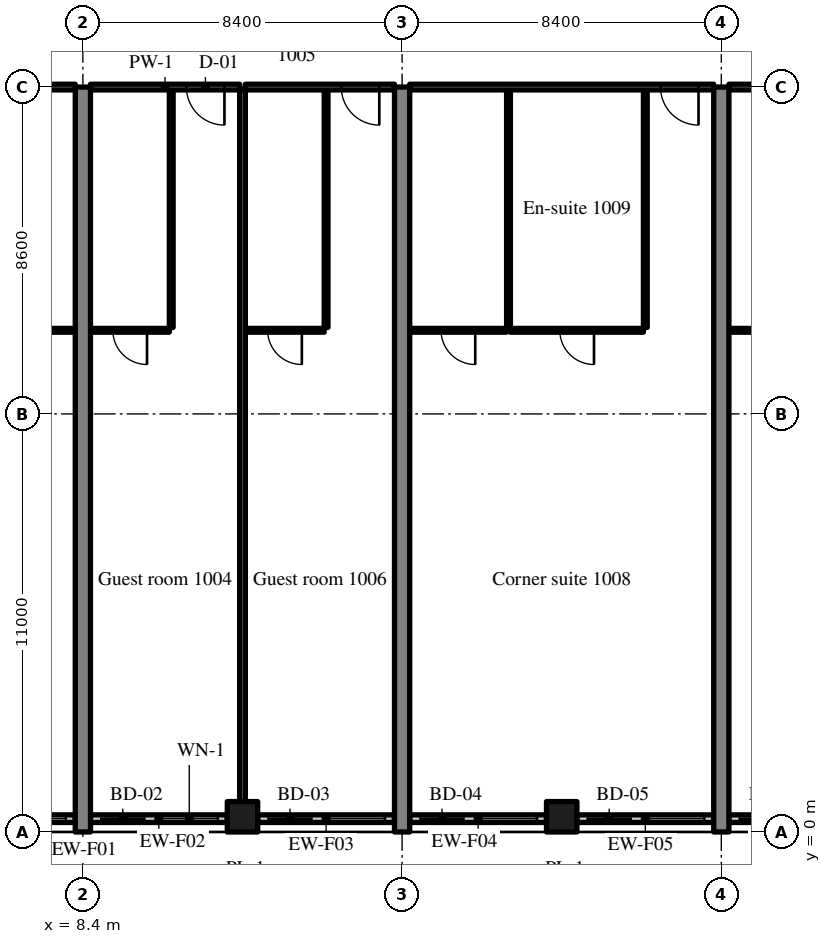
"""IFC4 building model, lengths in metres.
Left out: names, types, materials, properties, quantities, classifications, styles, units other than length and angle.
Written with IfcOpenShell. Run it as: python <this file> out.ifc"""

import sys

from ifc_helpers import new_model, si_unit, direction, frame, frame_2d, origin, origin_2d, place, context, subcontext, project, spatial, rectangle, extrude, source, transform, mapped, element, fill, save


model = new_model("IFC4")
c1 = context("Model", 3, precision=1e-05, world=origin(), true_north=direction((0.0, 1.0)))
c2 = subcontext(c1, "Body", "Model", "MODEL_VIEW")
j1 = project(units=[si_unit("LENGTHUNIT", "METRE"), si_unit("PLANEANGLEUNIT", "RADIAN")], contexts=[c1])
p1 = place(None, origin())
s1 = spatial("IfcSite", under=j1, at=p1, CompositionType="ELEMENT")
p2 = place(p1, origin())
s2 = spatial("IfcBuilding", under=s1, at=p2, CompositionType="ELEMENT")
p3 = place(p2, frame((0.0, 0.0, 46.8)))
s3 = spatial("IfcBuildingStorey", under=s2, at=p3, CompositionType="ELEMENT", Elevation=46.8)
m1 = source(origin(), c2, "Body", "SweptSolid", [
    extrude(rectangle(XDim=19.6, YDim=0.4, at=frame_2d((9.8, 0.0))), origin(), (0.0, 0.0, 1.0), 3.52),
])
for number, where, z_axis, x_axis in (
    (1, (8.4, 0.0, 0.0), (0.0, 0.0, 1.0), (0.0, 1.0, 0.0)),
    (2, (16.8, 0.0, 0.0), (0.0, 0.0, 1.0), (0.0, 1.0, 0.0)),
    (3, (25.2, 0.0, 0.0), (0.0, 0.0, 1.0), (0.0, 1.0, 0.0)),
):
    element("IfcWall", number, at=place(p3, frame(where, z_axis=z_axis, x_axis=x_axis)), inside=s3, PredefinedType="SHEAR", context=c2, shape_type="MappedRepresentation", body=[
        mapped(m1, transform((0.0, 0.0, 0.0), scale=1.0)),
    ])
m2 = source(origin(), c2, "Body", "SweptSolid", [
    extrude(rectangle(XDim=0.8, YDim=0.8, at=origin_2d()), origin(), (0.0, 0.0, 1.0), 3.52),
])
for number, where, z_axis, x_axis in (
    (4, (12.6, 0.4, 0.0), (0.0, 0.0, 1.0), (1.0, 0.0, 0.0)),
    (5, (21.0, 0.4, 0.0), (0.0, 0.0, 1.0), (1.0, 0.0, 0.0)),
):
    element("IfcColumn", number, at=place(p3, frame(where, z_axis=z_axis, x_axis=x_axis)), inside=s3, PredefinedType="COLUMN", context=c2, shape_type="MappedRepresentation", body=[
        mapped(m2, transform((0.0, 0.0, 0.0), scale=1.0)),
    ])
m3 = source(origin(), c2, "Body", "SweptSolid", [
    extrude(rectangle(XDim=4.055, YDim=0.2, at=frame_2d((2.027, 0.0))), origin(), (0.0, 0.0, 1.0), 2.82),
])
p4 = place(p3, frame((4.145, 0.35, 0.0), z_axis=(0.0, 0.0, 1.0), x_axis=(1.0, 0.0, 0.0)))
e6 = element("IfcWall", 6, at=p4, inside=s3, PredefinedType="SOLIDWALL", context=c2, shape_type="MappedRepresentation", body=[
    mapped(m3, transform((0.0, 0.0, 0.0), scale=1.0)),
])
m4 = source(origin(), c2, "Body", "SweptSolid", [
    extrude(rectangle(XDim=1.2, YDim=2.4, at=frame_2d((0.6, 1.2))), frame((0.0, 0.11, 0.0), z_axis=(0.0, -1.0, 0.0), x_axis=(1.0, 0.0, 0.0)), (0.0, 0.0, 1.0), 0.22),
])
p5 = place(p4, frame((0.25, 0.0, 0.0)))
e7 = element("IfcOpeningElement", 7, at=p5, cuts=e6, PredefinedType="OPENING", context=c2, shape_type="MappedRepresentation", body=[
    mapped(m4, transform((0.0, 0.0, 0.0), scale=1.0)),
])
m5 = source(origin(), c2, "Body", "SweptSolid", [
    extrude(rectangle(XDim=1.5, YDim=1.5, at=frame_2d((0.75, 0.75))), frame((0.0, 0.11, 0.0), z_axis=(0.0, -1.0, 0.0), x_axis=(1.0, 0.0, 0.0)), (0.0, 0.0, 1.0), 0.22),
])
p6 = place(p4, frame((2.305, 0.0, 0.9)))
e8 = element("IfcOpeningElement", 8, at=p6, cuts=e6, PredefinedType="OPENING", context=c2, shape_type="MappedRepresentation", body=[
    mapped(m5, transform((0.0, 0.0, 0.0), scale=1.0)),
])
m6 = source(origin(), c2, "Body", "SweptSolid", [
    extrude(rectangle(XDim=3.6, YDim=0.2, at=frame_2d((1.8, 0.0))), origin(), (0.0, 0.0, 1.0), 2.82),
])
p7 = place(p3, frame((8.6, 0.35, 0.0), z_axis=(0.0, 0.0, 1.0), x_axis=(1.0, 0.0, 0.0)))
e9 = element("IfcWall", 9, at=p7, inside=s3, PredefinedType="SOLIDWALL", context=c2, shape_type="MappedRepresentation", body=[
    mapped(m6, transform((0.0, 0.0, 0.0), scale=1.0)),
])
p8 = place(p7, frame((0.25, 0.0, 0.0)))
e10 = element("IfcOpeningElement", 10, at=p8, cuts=e9, PredefinedType="OPENING", context=c2, shape_type="MappedRepresentation", body=[
    mapped(m4, transform((0.0, 0.0, 0.0), scale=1.0)),
])
p9 = place(p7, frame((1.85, 0.0, 0.9)))
e11 = element("IfcOpeningElement", 11, at=p9, cuts=e9, PredefinedType="OPENING", context=c2, shape_type="MappedRepresentation", body=[
    mapped(m5, transform((0.0, 0.0, 0.0), scale=1.0)),
])
m7 = source(origin(), c2, "Body", "SweptSolid", [
    extrude(rectangle(XDim=3.6, YDim=0.2, at=frame_2d((1.8, 0.0))), origin(), (0.0, 0.0, 1.0), 2.82),
])
p10 = place(p3, frame((13.0, 0.35, 0.0), z_axis=(0.0, 0.0, 1.0), x_axis=(1.0, 0.0, 0.0)))
e12 = element("IfcWall", 12, at=p10, inside=s3, PredefinedType="SOLIDWALL", context=c2, shape_type="MappedRepresentation", body=[
    mapped(m7, transform((0.0, 0.0, 0.0), scale=1.0)),
])
p11 = place(p10, frame((0.25, 0.0, 0.0)))
e13 = element("IfcOpeningElement", 13, at=p11, cuts=e12, PredefinedType="OPENING", context=c2, shape_type="MappedRepresentation", body=[
    mapped(m4, transform((0.0, 0.0, 0.0), scale=1.0)),
])
p12 = place(p10, frame((1.85, 0.0, 0.9)))
e14 = element("IfcOpeningElement", 14, at=p12, cuts=e12, PredefinedType="OPENING", context=c2, shape_type="MappedRepresentation", body=[
    mapped(m5, transform((0.0, 0.0, 0.0), scale=1.0)),
])
p13 = place(p3, frame((17.0, 0.35, 0.0), z_axis=(0.0, 0.0, 1.0), x_axis=(1.0, 0.0, 0.0)))
e15 = element("IfcWall", 15, at=p13, inside=s3, PredefinedType="SOLIDWALL", context=c2, shape_type="MappedRepresentation", body=[
    mapped(m7, transform((0.0, 0.0, 0.0), scale=1.0)),
])
p14 = place(p13, frame((0.25, 0.0, 0.0)))
e16 = element("IfcOpeningElement", 16, at=p14, cuts=e15, PredefinedType="OPENING", context=c2, shape_type="MappedRepresentation", body=[
    mapped(m4, transform((0.0, 0.0, 0.0), scale=1.0)),
])
p15 = place(p13, frame((1.85, 0.0, 0.9)))
e17 = element("IfcOpeningElement", 17, at=p15, cuts=e15, PredefinedType="OPENING", context=c2, shape_type="MappedRepresentation", body=[
    mapped(m5, transform((0.0, 0.0, 0.0), scale=1.0)),
])
p16 = place(p3, frame((21.4, 0.35, 0.0), z_axis=(0.0, 0.0, 1.0), x_axis=(1.0, 0.0, 0.0)))
e18 = element("IfcWall", 18, at=p16, inside=s3, PredefinedType="SOLIDWALL", context=c2, shape_type="MappedRepresentation", body=[
    mapped(m7, transform((0.0, 0.0, 0.0), scale=1.0)),
])
p17 = place(p16, frame((0.25, 0.0, 0.0)))
e19 = element("IfcOpeningElement", 19, at=p17, cuts=e18, PredefinedType="OPENING", context=c2, shape_type="MappedRepresentation", body=[
    mapped(m4, transform((0.0, 0.0, 0.0), scale=1.0)),
])
p18 = place(p16, frame((1.85, 0.0, 0.9)))
e20 = element("IfcOpeningElement", 20, at=p18, cuts=e18, PredefinedType="OPENING", context=c2, shape_type="MappedRepresentation", body=[
    mapped(m5, transform((0.0, 0.0, 0.0), scale=1.0)),
])
p19 = place(p3, frame((25.4, 0.35, 0.0), z_axis=(0.0, 0.0, 1.0), x_axis=(1.0, 0.0, 0.0)))
e21 = element("IfcWall", 21, at=p19, inside=s3, PredefinedType="SOLIDWALL", context=c2, shape_type="MappedRepresentation", body=[
    mapped(m7, transform((0.0, 0.0, 0.0), scale=1.0)),
])
p20 = place(p19, frame((0.25, 0.0, 0.0)))
e22 = element("IfcOpeningElement", 22, at=p20, cuts=e21, PredefinedType="OPENING", context=c2, shape_type="MappedRepresentation", body=[
    mapped(m4, transform((0.0, 0.0, 0.0), scale=1.0)),
])
p21 = place(p19, frame((1.85, 0.0, 0.9)))
e23 = element("IfcOpeningElement", 23, at=p21, cuts=e21, PredefinedType="OPENING", context=c2, shape_type="MappedRepresentation", body=[
    mapped(m5, transform((0.0, 0.0, 0.0), scale=1.0)),
])
m8 = source(origin(), c2, "Body", "SweptSolid", [
    extrude(rectangle(XDim=2.35, YDim=0.1, at=frame_2d((1.175, 0.0))), origin(), (0.0, 0.0, 1.0), 3.52),
])
p22 = place(p3, frame((5.85, 13.2, 0.0), z_axis=(0.0, 0.0, 1.0), x_axis=(1.0, 0.0, 0.0)))
e24 = element("IfcWall", 24, at=p22, inside=s3, PredefinedType="PARTITIONING", context=c2, shape_type="MappedRepresentation", body=[
    mapped(m8, transform((0.0, 0.0, 0.0), scale=1.0)),
])
m9 = source(origin(), c2, "Body", "SweptSolid", [
    extrude(rectangle(XDim=0.9, YDim=2.1, at=frame_2d((0.45, 1.05))), frame((0.0, 0.06, 0.0), z_axis=(0.0, -1.0, 0.0), x_axis=(1.0, 0.0, 0.0)), (0.0, 0.0, 1.0), 0.12),
])
p23 = place(p22, frame((0.725, 0.0, 0.0)))
e25 = element("IfcOpeningElement", 25, at=p23, cuts=e24, PredefinedType="OPENING", context=c2, shape_type="MappedRepresentation", body=[
    mapped(m9, transform((0.0, 0.0, 0.0), scale=1.0)),
])
m10 = source(origin(), c2, "Body", "SweptSolid", [
    extrude(rectangle(XDim=7.8, YDim=0.15, at=frame_2d((3.9, 0.0))), origin(), (0.0, 0.0, 1.0), 2.82),
])
p24 = place(p3, frame((0.4, 19.6, 0.0), z_axis=(0.0, 0.0, 1.0), x_axis=(1.0, 0.0, 0.0)))
e26 = element("IfcWall", 26, at=p24, inside=s3, PredefinedType="PARTITIONING", context=c2, shape_type="MappedRepresentation", body=[
    mapped(m10, transform((0.0, 0.0, 0.0), scale=1.0)),
])
m11 = source(origin(), c2, "Body", "SweptSolid", [
    extrude(rectangle(XDim=1.0, YDim=2.1, at=frame_2d((0.5, 1.05))), frame((0.0, 0.085, 0.0), z_axis=(0.0, -1.0, 0.0), x_axis=(1.0, 0.0, 0.0)), (0.0, 0.0, 1.0), 0.17),
])
p25 = place(p24, frame((0.4, 0.0, 0.0)))
e27 = element("IfcOpeningElement", 27, at=p25, cuts=e26, PredefinedType="OPENING", context=c2, shape_type="MappedRepresentation", body=[
    mapped(m11, transform((0.0, 0.0, 0.0), scale=1.0)),
])
m12 = source(origin(), c2, "Body", "SweptSolid", [
    extrude(rectangle(XDim=6.25, YDim=0.1, at=frame_2d((3.125, 0.0))), origin(), (0.0, 0.0, 1.0), 3.52),
])
p26 = place(p3, frame((10.725, 13.275, 0.0), z_axis=(0.0, 0.0, 1.0), x_axis=(0.0, 1.0, 0.0)))
e28 = element("IfcWall", 28, at=p26, inside=s3, PredefinedType="PARTITIONING", context=c2, shape_type="MappedRepresentation", body=[
    mapped(m12, transform((0.0, 0.0, 0.0), scale=1.0)),
])
m13 = source(origin(), c2, "Body", "SweptSolid", [
    extrude(rectangle(XDim=2.075, YDim=0.1, at=frame_2d((1.038, 0.0))), origin(), (0.0, 0.0, 1.0), 3.52),
])
p27 = place(p3, frame((8.6, 13.2, 0.0), z_axis=(0.0, 0.0, 1.0), x_axis=(1.0, 0.0, 0.0)))
e29 = element("IfcWall", 29, at=p27, inside=s3, PredefinedType="PARTITIONING", context=c2, shape_type="MappedRepresentation", body=[
    mapped(m13, transform((0.0, 0.0, 0.0), scale=1.0)),
])
p28 = place(p27, frame((0.588, 0.0, 0.0)))
e30 = element("IfcOpeningElement", 30, at=p28, cuts=e29, PredefinedType="OPENING", context=c2, shape_type="MappedRepresentation", body=[
    mapped(m9, transform((0.0, 0.0, 0.0), scale=1.0)),
])
m14 = source(origin(), c2, "Body", "SweptSolid", [
    extrude(rectangle(XDim=3.925, YDim=0.15, at=frame_2d((1.962, 0.0))), origin(), (0.0, 0.0, 1.0), 2.82),
])
p29 = place(p3, frame((8.6, 19.6, 0.0), z_axis=(0.0, 0.0, 1.0), x_axis=(1.0, 0.0, 0.0)))
e31 = element("IfcWall", 31, at=p29, inside=s3, PredefinedType="PARTITIONING", context=c2, shape_type="MappedRepresentation", body=[
    mapped(m14, transform((0.0, 0.0, 0.0), scale=1.0)),
])
p30 = place(p29, frame((2.525, 0.0, 0.0)))
e32 = element("IfcOpeningElement", 32, at=p30, cuts=e31, PredefinedType="OPENING", context=c2, shape_type="MappedRepresentation", body=[
    mapped(m11, transform((0.0, 0.0, 0.0), scale=1.0)),
])
p31 = place(p3, frame((14.8, 13.275, 0.0), z_axis=(0.0, 0.0, 1.0), x_axis=(0.0, 1.0, 0.0)))
e33 = element("IfcWall", 33, at=p31, inside=s3, PredefinedType="PARTITIONING", context=c2, shape_type="MappedRepresentation", body=[
    mapped(m12, transform((0.0, 0.0, 0.0), scale=1.0)),
])
p32 = place(p3, frame((12.675, 13.2, 0.0), z_axis=(0.0, 0.0, 1.0), x_axis=(1.0, 0.0, 0.0)))
e34 = element("IfcWall", 34, at=p32, inside=s3, PredefinedType="PARTITIONING", context=c2, shape_type="MappedRepresentation", body=[
    mapped(m13, transform((0.0, 0.0, 0.0), scale=1.0)),
])
p33 = place(p32, frame((0.587, 0.0, 0.0)))
e35 = element("IfcOpeningElement", 35, at=p33, cuts=e34, PredefinedType="OPENING", context=c2, shape_type="MappedRepresentation", body=[
    mapped(m9, transform((0.0, 0.0, 0.0), scale=1.0)),
])
m15 = source(origin(), c2, "Body", "SweptSolid", [
    extrude(rectangle(XDim=3.925, YDim=0.15, at=frame_2d((1.962, 0.0))), origin(), (0.0, 0.0, 1.0), 2.82),
])
p34 = place(p3, frame((12.675, 19.6, 0.0), z_axis=(0.0, 0.0, 1.0), x_axis=(1.0, 0.0, 0.0)))
e36 = element("IfcWall", 36, at=p34, inside=s3, PredefinedType="PARTITIONING", context=c2, shape_type="MappedRepresentation", body=[
    mapped(m15, transform((0.0, 0.0, 0.0), scale=1.0)),
])
p35 = place(p34, frame((2.525, 0.0, 0.0)))
e37 = element("IfcOpeningElement", 37, at=p35, cuts=e36, PredefinedType="OPENING", context=c2, shape_type="MappedRepresentation", body=[
    mapped(m11, transform((0.0, 0.0, 0.0), scale=1.0)),
])
m16 = source(origin(), c2, "Body", "SweptSolid", [
    extrude(rectangle(XDim=18.725, YDim=0.15, at=frame_2d((9.362, 0.0))), origin(), (0.0, 0.0, 1.0), 3.52),
])
p36 = place(p3, frame((12.6, 0.8, 0.0), z_axis=(0.0, 0.0, 1.0), x_axis=(0.0, 1.0, 0.0)))
e38 = element("IfcWall", 38, at=p36, inside=s3, PredefinedType="PARTITIONING", context=c2, shape_type="MappedRepresentation", body=[
    mapped(m16, transform((0.0, 0.0, 0.0), scale=1.0)),
])
for number, where, z_axis, x_axis in (
    (39, (23.2, 13.275, 0.0), (0.0, 0.0, 1.0), (0.0, 1.0, 0.0)),
    (40, (19.6, 13.275, 0.0), (0.0, 0.0, 1.0), (0.0, 1.0, 0.0)),
):
    element("IfcWall", number, at=place(p3, frame(where, z_axis=z_axis, x_axis=x_axis)), inside=s3, PredefinedType="PARTITIONING", context=c2, shape_type="MappedRepresentation", body=[
        mapped(m12, transform((0.0, 0.0, 0.0), scale=1.0)),
    ])
m17 = source(origin(), c2, "Body", "SweptSolid", [
    extrude(rectangle(XDim=3.5, YDim=0.1, at=frame_2d((1.75, 0.0))), origin(), (0.0, 0.0, 1.0), 3.52),
])
p37 = place(p3, frame((19.65, 13.2, 0.0), z_axis=(0.0, 0.0, 1.0), x_axis=(1.0, 0.0, 0.0)))
e41 = element("IfcWall", 41, at=p37, inside=s3, PredefinedType="PARTITIONING", context=c2, shape_type="MappedRepresentation", body=[
    mapped(m17, transform((0.0, 0.0, 0.0), scale=1.0)),
])
p38 = place(p37, frame((1.3, 0.0, 0.0)))
e42 = element("IfcOpeningElement", 42, at=p38, cuts=e41, PredefinedType="OPENING", context=c2, shape_type="MappedRepresentation", body=[
    mapped(m9, transform((0.0, 0.0, 0.0), scale=1.0)),
])
m18 = source(origin(), c2, "Body", "SweptSolid", [
    extrude(rectangle(XDim=2.55, YDim=0.1, at=frame_2d((1.275, 0.0))), origin(), (0.0, 0.0, 1.0), 3.52),
])
p39 = place(p3, frame((17.0, 13.2, 0.0), z_axis=(0.0, 0.0, 1.0), x_axis=(1.0, 0.0, 0.0)))
e43 = element("IfcWall", 43, at=p39, inside=s3, PredefinedType="PARTITIONING", context=c2, shape_type="MappedRepresentation", body=[
    mapped(m18, transform((0.0, 0.0, 0.0), scale=1.0)),
])
p40 = place(p39, frame((0.825, 0.0, 0.0)))
e44 = element("IfcOpeningElement", 44, at=p40, cuts=e43, PredefinedType="OPENING", context=c2, shape_type="MappedRepresentation", body=[
    mapped(m9, transform((0.0, 0.0, 0.0), scale=1.0)),
])
m19 = source(origin(), c2, "Body", "SweptSolid", [
    extrude(rectangle(XDim=8.0, YDim=0.15, at=frame_2d((4.0, 0.0))), origin(), (0.0, 0.0, 1.0), 2.82),
])
p41 = place(p3, frame((17.0, 19.6, 0.0), z_axis=(0.0, 0.0, 1.0), x_axis=(1.0, 0.0, 0.0)))
e45 = element("IfcWall", 45, at=p41, inside=s3, PredefinedType="PARTITIONING", context=c2, shape_type="MappedRepresentation", body=[
    mapped(m19, transform((0.0, 0.0, 0.0), scale=1.0)),
])
p42 = place(p41, frame((6.6, 0.0, 0.0)))
e46 = element("IfcOpeningElement", 46, at=p42, cuts=e45, PredefinedType="OPENING", context=c2, shape_type="MappedRepresentation", body=[
    mapped(m11, transform((0.0, 0.0, 0.0), scale=1.0)),
])
p43 = place(p3, frame((25.4, 13.2, 0.0), z_axis=(0.0, 0.0, 1.0), x_axis=(1.0, 0.0, 0.0)))
e47 = element("IfcWall", 47, at=p43, inside=s3, PredefinedType="PARTITIONING", context=c2, shape_type="MappedRepresentation", body=[
    mapped(m18, transform((0.0, 0.0, 0.0), scale=1.0)),
])
p44 = place(p43, frame((0.825, 0.0, 0.0)))
e48 = element("IfcOpeningElement", 48, at=p44, cuts=e47, PredefinedType="OPENING", context=c2, shape_type="MappedRepresentation", body=[
    mapped(m9, transform((0.0, 0.0, 0.0), scale=1.0)),
])
p45 = place(p3, frame((25.4, 19.6, 0.0), z_axis=(0.0, 0.0, 1.0), x_axis=(1.0, 0.0, 0.0)))
e49 = element("IfcWall", 49, at=p45, inside=s3, PredefinedType="PARTITIONING", context=c2, shape_type="MappedRepresentation", body=[
    mapped(m19, transform((0.0, 0.0, 0.0), scale=1.0)),
])
p46 = place(p45, frame((6.6, 0.0, 0.0)))
e50 = element("IfcOpeningElement", 50, at=p46, cuts=e49, PredefinedType="OPENING", context=c2, shape_type="MappedRepresentation", body=[
    mapped(m11, transform((0.0, 0.0, 0.0), scale=1.0)),
])
m20 = source(origin(), c2, "Body", "SweptSolid", [
    extrude(rectangle(XDim=1.5, YDim=1.5, at=frame_2d((0.75, 0.75))), frame((0.0, 0.03, 0.0), z_axis=(0.0, -1.0, 0.0), x_axis=(1.0, 0.0, 0.0)), (0.0, 0.0, 1.0), 0.06),
])
p47 = place(p6, origin())
e51 = element("IfcWindow", 51, at=p47, inside=s3, PartitioningType="SINGLE_PANEL", PredefinedType="WINDOW", context=c2, shape_type="MappedRepresentation", body=[
    mapped(m20, transform((0.0, 0.0, 0.0), scale=1.0)),
])
fill(e8, e51)
m21 = source(origin(), c2, "Body", "SweptSolid", [
    extrude(rectangle(XDim=1.2, YDim=2.4, at=frame_2d((0.6, 1.2))), frame((0.0, 0.025, 0.0), z_axis=(0.0, -1.0, 0.0), x_axis=(1.0, 0.0, 0.0)), (0.0, 0.0, 1.0), 0.05),
])
p48 = place(p8, origin())
e52 = element("IfcDoor", 52, at=p48, inside=s3, OperationType="SLIDING_TO_RIGHT", PredefinedType="DOOR", context=c2, shape_type="MappedRepresentation", body=[
    mapped(m21, transform((0.0, 0.0, 0.0), scale=1.0)),
])
fill(e10, e52)
p49 = place(p9, origin())
e53 = element("IfcWindow", 53, at=p49, inside=s3, PartitioningType="SINGLE_PANEL", PredefinedType="WINDOW", context=c2, shape_type="MappedRepresentation", body=[
    mapped(m20, transform((0.0, 0.0, 0.0), scale=1.0)),
])
fill(e11, e53)
p50 = place(p11, origin())
e54 = element("IfcDoor", 54, at=p50, inside=s3, OperationType="SLIDING_TO_LEFT", PredefinedType="DOOR", context=c2, shape_type="MappedRepresentation", body=[
    mapped(m21, transform((0.0, 0.0, 0.0), scale=1.0)),
])
fill(e13, e54)
p51 = place(p12, origin())
e55 = element("IfcWindow", 55, at=p51, inside=s3, PartitioningType="SINGLE_PANEL", PredefinedType="WINDOW", context=c2, shape_type="MappedRepresentation", body=[
    mapped(m20, transform((0.0, 0.0, 0.0), scale=1.0)),
])
fill(e14, e55)
p52 = place(p14, origin())
e56 = element("IfcDoor", 56, at=p52, inside=s3, OperationType="SLIDING_TO_RIGHT", PredefinedType="DOOR", context=c2, shape_type="MappedRepresentation", body=[
    mapped(m21, transform((0.0, 0.0, 0.0), scale=1.0)),
])
fill(e16, e56)
p53 = place(p15, origin())
e57 = element("IfcWindow", 57, at=p53, inside=s3, PartitioningType="SINGLE_PANEL", PredefinedType="WINDOW", context=c2, shape_type="MappedRepresentation", body=[
    mapped(m20, transform((0.0, 0.0, 0.0), scale=1.0)),
])
fill(e17, e57)
p54 = place(p17, origin())
e58 = element("IfcDoor", 58, at=p54, inside=s3, OperationType="SLIDING_TO_LEFT", PredefinedType="DOOR", context=c2, shape_type="MappedRepresentation", body=[
    mapped(m21, transform((0.0, 0.0, 0.0), scale=1.0)),
])
fill(e19, e58)
p55 = place(p18, origin())
e59 = element("IfcWindow", 59, at=p55, inside=s3, PartitioningType="SINGLE_PANEL", PredefinedType="WINDOW", context=c2, shape_type="MappedRepresentation", body=[
    mapped(m20, transform((0.0, 0.0, 0.0), scale=1.0)),
])
fill(e20, e59)
p56 = place(p20, origin())
e60 = element("IfcDoor", 60, at=p56, inside=s3, OperationType="SLIDING_TO_RIGHT", PredefinedType="DOOR", context=c2, shape_type="MappedRepresentation", body=[
    mapped(m21, transform((0.0, 0.0, 0.0), scale=1.0)),
])
fill(e22, e60)
m22 = source(origin(), c2, "Body", "SweptSolid", [
    extrude(rectangle(XDim=0.9, YDim=2.1, at=frame_2d((0.45, 1.05))), frame((0.0, 0.025, 0.0), z_axis=(0.0, -1.0, 0.0), x_axis=(1.0, 0.0, 0.0)), (0.0, 0.0, 1.0), 0.05),
])
p57 = place(p28, origin())
e61 = element("IfcDoor", 61, at=p57, inside=s3, OperationType="SINGLE_SWING_RIGHT", PredefinedType="DOOR", context=c2, shape_type="MappedRepresentation", body=[
    mapped(m22, transform((0.0, 0.0, 0.0), scale=1.0)),
])
fill(e30, e61)
m23 = source(origin(), c2, "Body", "SweptSolid", [
    extrude(rectangle(XDim=1.0, YDim=2.1, at=frame_2d((0.5, 1.05))), frame((0.0, 0.025, 0.0), z_axis=(0.0, -1.0, 0.0), x_axis=(1.0, 0.0, 0.0)), (0.0, 0.0, 1.0), 0.05),
])
p58 = place(p30, origin())
e62 = element("IfcDoor", 62, at=p58, inside=s3, OperationType="SINGLE_SWING_RIGHT", PredefinedType="DOOR", context=c2, shape_type="MappedRepresentation", body=[
    mapped(m23, transform((0.0, 0.0, 0.0), scale=1.0)),
])
fill(e32, e62)
p59 = place(p33, origin())
e63 = element("IfcDoor", 63, at=p59, inside=s3, OperationType="SINGLE_SWING_RIGHT", PredefinedType="DOOR", context=c2, shape_type="MappedRepresentation", body=[
    mapped(m22, transform((0.0, 0.0, 0.0), scale=1.0)),
])
fill(e35, e63)
p60 = place(p35, origin())
e64 = element("IfcDoor", 64, at=p60, inside=s3, OperationType="SINGLE_SWING_RIGHT", PredefinedType="DOOR", context=c2, shape_type="MappedRepresentation", body=[
    mapped(m23, transform((0.0, 0.0, 0.0), scale=1.0)),
])
fill(e37, e64)
p61 = place(p38, origin())
e65 = element("IfcDoor", 65, at=p61, inside=s3, OperationType="SINGLE_SWING_RIGHT", PredefinedType="DOOR", context=c2, shape_type="MappedRepresentation", body=[
    mapped(m22, transform((0.0, 0.0, 0.0), scale=1.0)),
])
fill(e42, e65)
p62 = place(p40, origin())
e66 = element("IfcDoor", 66, at=p62, inside=s3, OperationType="SINGLE_SWING_RIGHT", PredefinedType="DOOR", context=c2, shape_type="MappedRepresentation", body=[
    mapped(m22, transform((0.0, 0.0, 0.0), scale=1.0)),
])
fill(e44, e66)
p63 = place(p42, origin())
e67 = element("IfcDoor", 67, at=p63, inside=s3, OperationType="SINGLE_SWING_RIGHT", PredefinedType="DOOR", context=c2, shape_type="MappedRepresentation", body=[
    mapped(m23, transform((0.0, 0.0, 0.0), scale=1.0)),
])
fill(e46, e67)
save(model, sys.argv[1])
